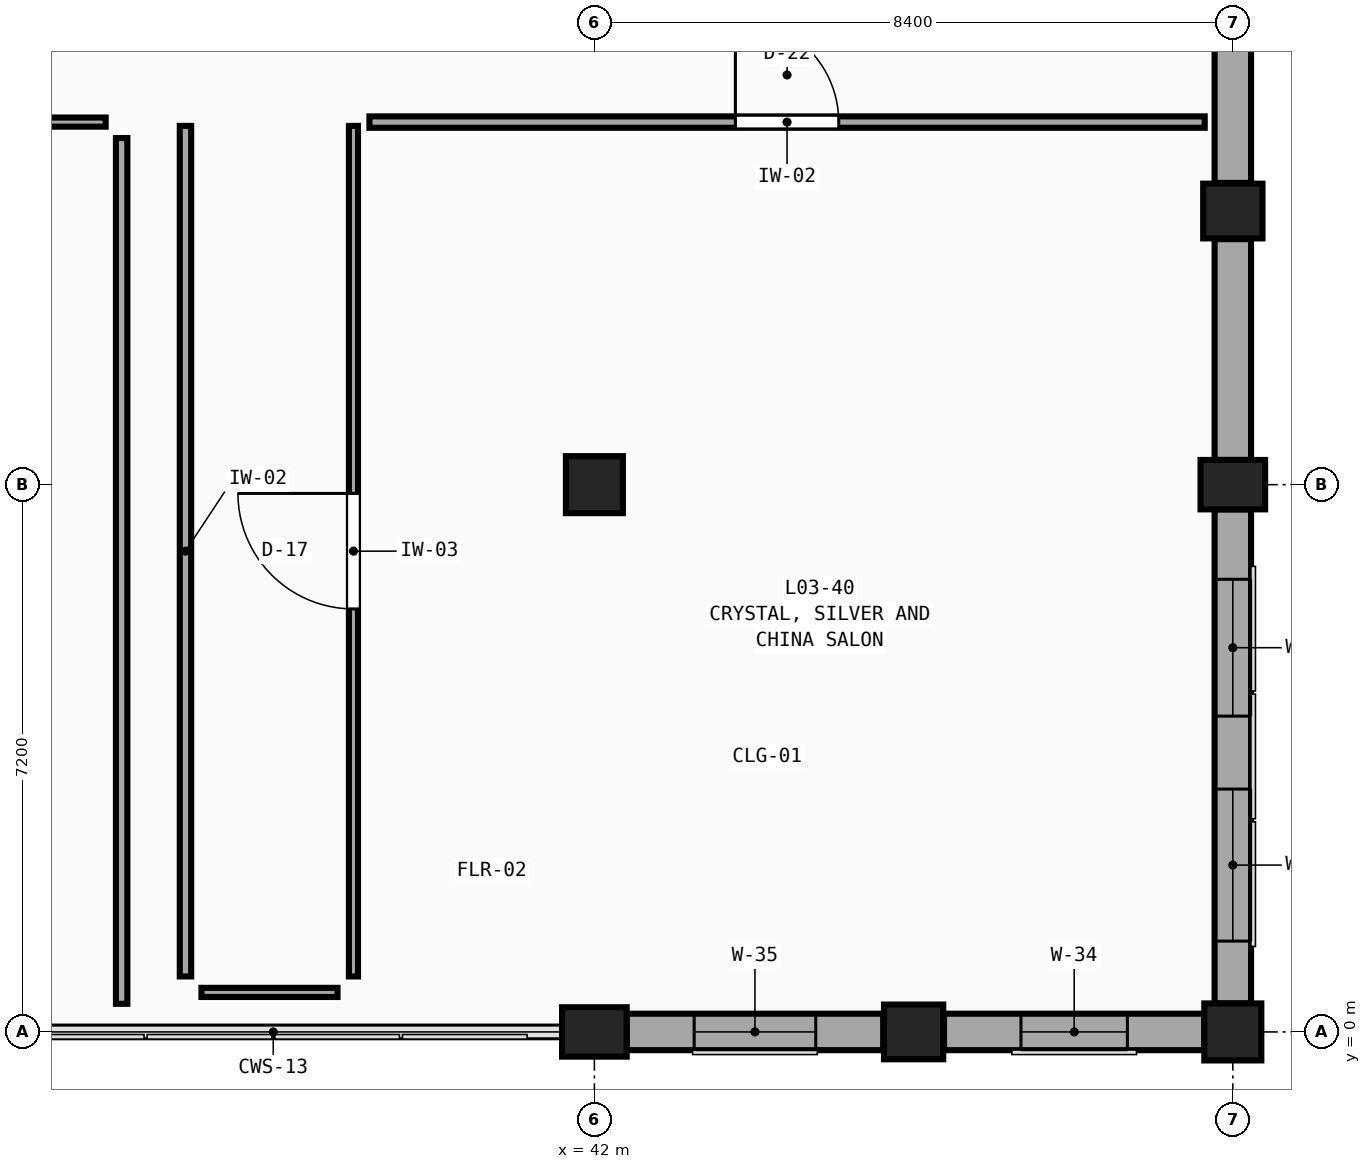
"""IFC4 building model, lengths in metres.
Left out: names, types, materials, properties, quantities, classifications, styles, units other than length and angle.
Written with IfcOpenShell. Run it as: python <this file> out.ifc"""

import sys

from ifc_helpers import new_model, si_unit, direction, frame, frame_2d, origin, origin_2d, place, context, subcontext, project, spatial, rectangle, extrude, element, fill, save


model = new_model("IFC4")
c1 = context("Model", 3, precision=1e-05, world=origin(), true_north=direction((0.0, 1.0)))
c2 = subcontext(c1, "Body", "Model", "MODEL_VIEW")
j1 = project(units=[si_unit("LENGTHUNIT", "METRE"), si_unit("PLANEANGLEUNIT", "RADIAN")], contexts=[c1])
p1 = place(None, origin())
s1 = spatial("IfcSite", under=j1, at=p1, CompositionType="ELEMENT")
p2 = place(p1, origin())
s2 = spatial("IfcBuilding", under=s1, at=p2, CompositionType="ELEMENT")
p3 = place(p2, frame((0.0, 0.0, 14.4)))
s3 = spatial("IfcBuildingStorey", under=s2, at=p3, CompositionType="ELEMENT", Elevation=14.4)
p4 = place(p3, frame((42.0, 0.0, 0.0), z_axis=(0.0, 0.0, 1.0), x_axis=(1.0, 0.0, 0.0)))
e1 = element("IfcColumn", 1, at=p4, inside=s3, PredefinedType="COLUMN", context=c2, shape_type="SweptSolid", body=[
    extrude(rectangle(XDim=0.85, YDim=0.65, at=origin_2d()), origin(), (0.0, 0.0, 1.0), 4.5),
])
for number, where, z_axis, x_axis in (
    (2, (42.0, 7.2, 0.0), (0.0, 0.0, 1.0), (1.0, 0.0, 0.0)),
    (3, (50.4, 0.0, 0.0), (0.0, 0.0, 1.0), (1.0, 0.0, 0.0)),
):
    element("IfcColumn", number, at=place(p3, frame(where, z_axis=z_axis, x_axis=x_axis)), inside=s3, PredefinedType="COLUMN", context=c2, shape_type="SweptSolid", body=[
        extrude(rectangle(XDim=0.75, YDim=0.75, at=origin_2d()), origin(), (0.0, 0.0, 1.0), 4.5),
    ])
p5 = place(p3, frame((50.4, 7.2, 0.0), z_axis=(0.0, 0.0, 1.0), x_axis=(1.0, 0.0, 0.0)))
e4 = element("IfcColumn", 4, at=p5, inside=s3, PredefinedType="COLUMN", context=c2, shape_type="SweptSolid", body=[
    extrude(rectangle(XDim=0.85, YDim=0.65, at=origin_2d()), origin(), (0.0, 0.0, 1.0), 4.5),
])
for number, where, z_axis, x_axis in (
    (5, (46.2, 0.0, 0.0), (0.0, 0.0, 1.0), (1.0, 0.0, 0.0)),
    (6, (50.4, 10.8, 0.0), (0.0, 0.0, 1.0), (1.0, 0.0, 0.0)),
):
    element("IfcColumn", number, at=place(p3, frame(where, z_axis=z_axis, x_axis=x_axis)), inside=s3, PredefinedType="PILASTER", context=c2, shape_type="SweptSolid", body=[
        extrude(rectangle(XDim=0.78, YDim=0.72, at=origin_2d()), origin(), (0.0, 0.0, 1.0), 4.5),
    ])
p6 = place(p3, frame((50.025, 0.0, 0.0), z_axis=(0.0, 0.0, 1.0), x_axis=(-1.0, 0.0, 0.0)))
e7 = element("IfcWall", 7, at=p6, inside=s3, PredefinedType="SOLIDWALL", context=c2, shape_type="SweptSolid", body=[
    extrude(rectangle(XDim=3.425, YDim=0.48, at=frame_2d((1.712, 0.0))), origin(), (0.0, 0.0, 1.0), 3.63),
])
p7 = place(p6, frame((1.012, 0.0, 0.75)))
e8 = element("IfcOpeningElement", 8, at=p7, cuts=e7, PredefinedType="OPENING", context=c2, shape_type="SweptSolid", body=[
    extrude(rectangle(XDim=1.4, YDim=2.62, at=frame_2d((0.7, 1.31))), frame((0.0, 0.26, 0.0), z_axis=(0.0, -1.0, 0.0), x_axis=(1.0, 0.0, 0.0)), (0.0, 0.0, 1.0), 0.52),
])
p8 = place(p3, frame((45.8, 0.0, 0.0), z_axis=(0.0, 0.0, 1.0), x_axis=(-1.0, 0.0, 0.0)))
e9 = element("IfcWall", 9, at=p8, inside=s3, PredefinedType="SOLIDWALL", context=c2, shape_type="SweptSolid", body=[
    extrude(rectangle(XDim=3.375, YDim=0.48, at=frame_2d((1.688, 0.0))), origin(), (0.0, 0.0, 1.0), 3.63),
])
p9 = place(p8, frame((0.887, 0.0, 0.75)))
e10 = element("IfcOpeningElement", 10, at=p9, cuts=e9, PredefinedType="OPENING", context=c2, shape_type="SweptSolid", body=[
    extrude(rectangle(XDim=1.6, YDim=2.62, at=frame_2d((0.8, 1.31))), frame((0.0, 0.26, 0.0), z_axis=(0.0, -1.0, 0.0), x_axis=(1.0, 0.0, 0.0)), (0.0, 0.0, 1.0), 0.52),
])
p10 = place(p3, frame((50.4, 6.875, 0.0), z_axis=(0.0, 0.0, 1.0), x_axis=(0.0, -1.0, 0.0)))
e11 = element("IfcWall", 11, at=p10, inside=s3, PredefinedType="SOLIDWALL", context=c2, shape_type="SweptSolid", body=[
    extrude(rectangle(XDim=6.5, YDim=0.48, at=frame_2d((3.25, 0.0))), origin(), (0.0, 0.0, 1.0), 3.63),
])
p11 = place(p10, frame((0.92, 0.0, 0.75)))
e12 = element("IfcOpeningElement", 12, at=p11, cuts=e11, PredefinedType="OPENING", context=c2, shape_type="SweptSolid", body=[
    extrude(rectangle(XDim=1.8, YDim=2.62, at=frame_2d((0.9, 1.31))), frame((0.0, 0.26, 0.0), z_axis=(0.0, -1.0, 0.0), x_axis=(1.0, 0.0, 0.0)), (0.0, 0.0, 1.0), 0.52),
])
p12 = place(p10, frame((3.68, 0.0, 0.75)))
e13 = element("IfcOpeningElement", 13, at=p12, cuts=e11, PredefinedType="OPENING", context=c2, shape_type="SweptSolid", body=[
    extrude(rectangle(XDim=2.0, YDim=2.62, at=frame_2d((1.0, 1.31))), frame((0.0, 0.26, 0.0), z_axis=(0.0, -1.0, 0.0), x_axis=(1.0, 0.0, 0.0)), (0.0, 0.0, 1.0), 0.52),
])
p13 = place(p3, frame((50.4, 14.025, 0.0), z_axis=(0.0, 0.0, 1.0), x_axis=(0.0, -1.0, 0.0)))
e14 = element("IfcWall", 14, at=p13, inside=s3, PredefinedType="SOLIDWALL", context=c2, shape_type="SweptSolid", body=[
    extrude(rectangle(XDim=2.855, YDim=0.48, at=frame_2d((1.427, 0.0))), origin(), (0.0, 0.0, 1.0), 3.63),
])
p14 = place(p3, frame((50.4, 10.43, 0.0), z_axis=(0.0, 0.0, 1.0), x_axis=(0.0, -1.0, 0.0)))
e15 = element("IfcWall", 15, at=p14, inside=s3, PredefinedType="SOLIDWALL", context=c2, shape_type="SweptSolid", body=[
    extrude(rectangle(XDim=2.905, YDim=0.48, at=frame_2d((1.453, 0.0))), origin(), (0.0, 0.0, 1.0), 3.63),
])
p15 = place(p3, frame((22.24, 11.97, 0.0), z_axis=(0.0, 0.0, 1.0), x_axis=(1.0, 0.0, 0.0)))
e16 = element("IfcWall", 16, at=p15, inside=s3, PredefinedType="PARTITIONING", context=c2, shape_type="SweptSolid", body=[
    extrude(rectangle(XDim=13.33, YDim=0.12, at=frame_2d((6.665, 0.0))), origin(), (0.0, 0.0, 1.0), 4.18),
])
p16 = place(p15, frame((6.145, 0.0, 0.0)))
e17 = element("IfcOpeningElement", 17, at=p16, cuts=e16, PredefinedType="OPENING", context=c2, shape_type="SweptSolid", body=[
    extrude(rectangle(XDim=1.04, YDim=2.13, at=frame_2d((0.52, 1.065))), frame((0.0, 0.08, 0.0), z_axis=(0.0, -1.0, 0.0), x_axis=(1.0, 0.0, 0.0)), (0.0, 0.0, 1.0), 0.16),
])
p17 = place(p3, frame((36.62, 0.73, 0.0), z_axis=(0.0, 0.0, 1.0), x_axis=(0.0, 1.0, 0.0)))
e18 = element("IfcWall", 18, at=p17, inside=s3, PredefinedType="PARTITIONING", context=c2, shape_type="SweptSolid", body=[
    extrude(rectangle(XDim=11.19, YDim=0.15, at=frame_2d((5.595, 0.0))), origin(), (0.0, 0.0, 1.0), 4.18),
])
p18 = place(p3, frame((38.83, 0.73, 0.0), z_axis=(0.0, 0.0, 1.0), x_axis=(0.0, 1.0, 0.0)))
e19 = element("IfcWall", 19, at=p18, inside=s3, PredefinedType="PARTITIONING", context=c2, shape_type="SweptSolid", body=[
    extrude(rectangle(XDim=11.19, YDim=0.12, at=frame_2d((5.595, 0.0))), origin(), (0.0, 0.0, 1.0), 4.18),
])
p19 = place(p18, frame((4.835, 0.0, 0.0)))
e20 = element("IfcOpeningElement", 20, at=p19, cuts=e19, PredefinedType="OPENING", context=c2, shape_type="SweptSolid", body=[
    extrude(rectangle(XDim=1.52, YDim=2.21, at=frame_2d((0.76, 1.105))), frame((0.0, 0.08, 0.0), z_axis=(0.0, -1.0, 0.0), x_axis=(1.0, 0.0, 0.0)), (0.0, 0.0, 1.0), 0.16),
])
p20 = place(p3, frame((39.04, 11.97, 0.0), z_axis=(0.0, 0.0, 1.0), x_axis=(1.0, 0.0, 0.0)))
e21 = element("IfcWall", 21, at=p20, inside=s3, PredefinedType="PARTITIONING", context=c2, shape_type="SweptSolid", body=[
    extrude(rectangle(XDim=10.99, YDim=0.15, at=frame_2d((5.495, 0.0))), origin(), (0.0, 0.0, 1.0), 4.18),
])
p21 = place(p20, frame((4.815, 0.0, 0.0)))
e22 = element("IfcOpeningElement", 22, at=p21, cuts=e21, PredefinedType="OPENING", context=c2, shape_type="SweptSolid", body=[
    extrude(rectangle(XDim=1.36, YDim=2.29, at=frame_2d((0.68, 1.145))), frame((0.0, 0.095, 0.0), z_axis=(0.0, -1.0, 0.0), x_axis=(1.0, 0.0, 0.0)), (0.0, 0.0, 1.0), 0.19),
])
p22 = place(p3, frame((36.83, 0.52, 0.0), z_axis=(0.0, 0.0, 1.0), x_axis=(1.0, 0.0, 0.0)))
e23 = element("IfcWall", 23, at=p22, inside=s3, PredefinedType="PARTITIONING", context=c2, shape_type="SweptSolid", body=[
    extrude(rectangle(XDim=1.79, YDim=0.12, at=frame_2d((0.895, 0.0))), origin(), (0.0, 0.0, 1.0), 3.63),
])
p23 = place(p3, frame((35.78, 0.37, 0.0), z_axis=(0.0, 0.0, 1.0), x_axis=(0.0, 1.0, 0.0)))
e24 = element("IfcWall", 24, at=p23, inside=s3, PredefinedType="PARTITIONING", context=c2, shape_type="SweptSolid", body=[
    extrude(rectangle(XDim=11.39, YDim=0.15, at=frame_2d((5.695, 0.0))), origin(), (0.0, 0.0, 1.0), 4.18),
])
p24 = place(p7, origin())
e25 = element("IfcWindow", 25, at=p24, inside=s3, PartitioningType="DOUBLE_PANEL_VERTICAL", PredefinedType="WINDOW", context=c2, shape_type="SweptSolid", body=[
    extrude(rectangle(XDim=1.4, YDim=2.62, at=frame_2d((0.7, 1.31))), frame((0.0, 0.03, 0.0), z_axis=(0.0, -1.0, 0.0), x_axis=(1.0, 0.0, 0.0)), (0.0, 0.0, 1.0), 0.06),
])
fill(e8, e25)
p25 = place(p9, origin())
e26 = element("IfcWindow", 26, at=p25, inside=s3, PartitioningType="DOUBLE_PANEL_VERTICAL", PredefinedType="WINDOW", context=c2, shape_type="SweptSolid", body=[
    extrude(rectangle(XDim=1.6, YDim=2.62, at=frame_2d((0.8, 1.31))), frame((0.0, 0.03, 0.0), z_axis=(0.0, -1.0, 0.0), x_axis=(1.0, 0.0, 0.0)), (0.0, 0.0, 1.0), 0.06),
])
fill(e10, e26)
p26 = place(p11, origin())
e27 = element("IfcWindow", 27, at=p26, inside=s3, PartitioningType="DOUBLE_PANEL_VERTICAL", PredefinedType="WINDOW", context=c2, shape_type="SweptSolid", body=[
    extrude(rectangle(XDim=1.8, YDim=2.62, at=frame_2d((0.9, 1.31))), frame((0.0, 0.03, 0.0), z_axis=(0.0, -1.0, 0.0), x_axis=(1.0, 0.0, 0.0)), (0.0, 0.0, 1.0), 0.06),
])
fill(e12, e27)
p27 = place(p12, origin())
e28 = element("IfcWindow", 28, at=p27, inside=s3, PartitioningType="TRIPLE_PANEL_VERTICAL", PredefinedType="WINDOW", context=c2, shape_type="SweptSolid", body=[
    extrude(rectangle(XDim=2.0, YDim=2.62, at=frame_2d((1.0, 1.31))), frame((0.0, 0.03, 0.0), z_axis=(0.0, -1.0, 0.0), x_axis=(1.0, 0.0, 0.0)), (0.0, 0.0, 1.0), 0.06),
])
fill(e13, e28)
p28 = place(p19, origin())
e29 = element("IfcDoor", 29, at=p28, inside=s3, OperationType="SINGLE_SWING_RIGHT", PredefinedType="DOOR", context=c2, shape_type="SweptSolid", body=[
    extrude(rectangle(XDim=1.52, YDim=2.21, at=frame_2d((0.76, 1.105))), frame((0.0, 0.025, 0.0), z_axis=(0.0, -1.0, 0.0), x_axis=(1.0, 0.0, 0.0)), (0.0, 0.0, 1.0), 0.05),
])
fill(e20, e29)
p29 = place(p21, origin())
e30 = element("IfcDoor", 30, at=p29, inside=s3, OperationType="SINGLE_SWING_LEFT", PredefinedType="DOOR", context=c2, shape_type="SweptSolid", body=[
    extrude(rectangle(XDim=1.36, YDim=2.29, at=frame_2d((0.68, 1.145))), frame((0.0, 0.025, 0.0), z_axis=(0.0, -1.0, 0.0), x_axis=(1.0, 0.0, 0.0)), (0.0, 0.0, 1.0), 0.05),
])
fill(e22, e30)
save(model, sys.argv[1])
